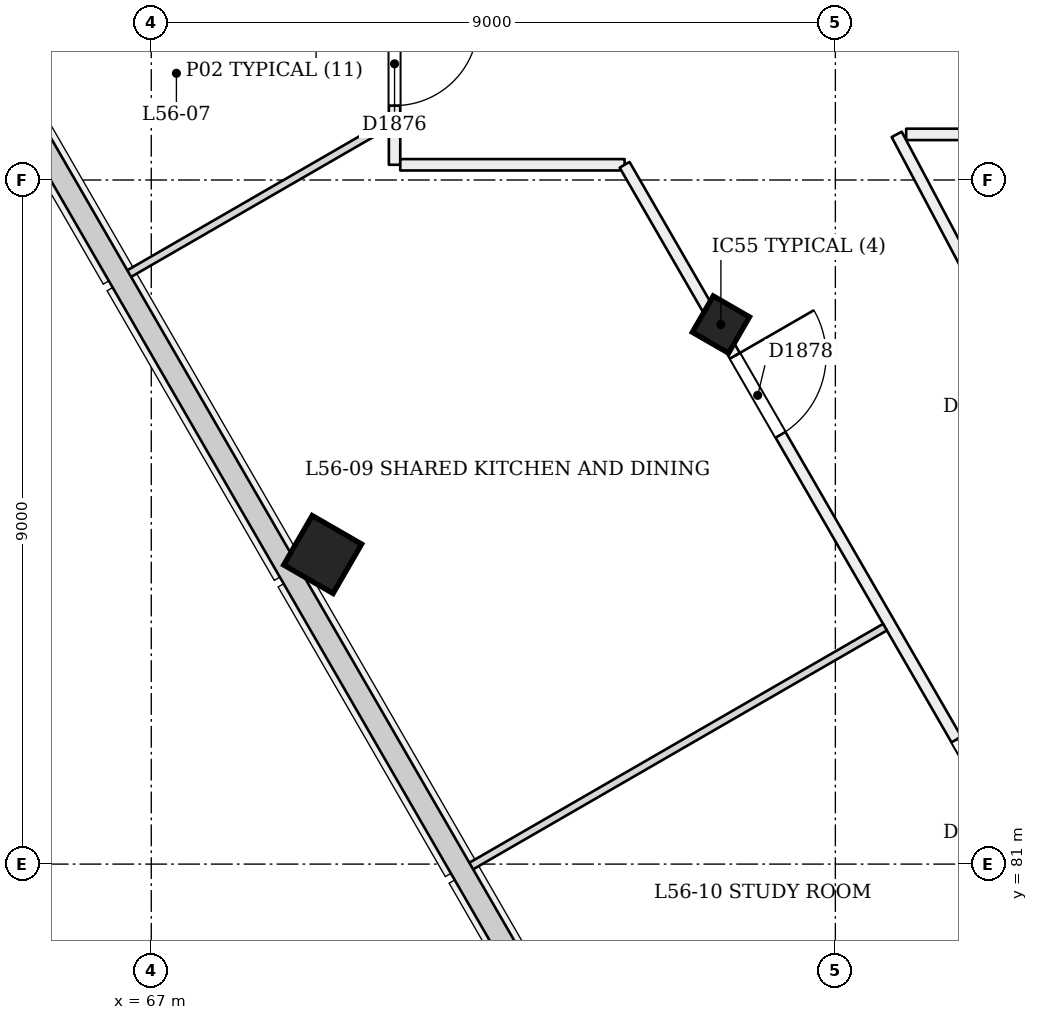
"""IFC4 building model, lengths in metres.
Left out: names, types, materials, properties, quantities, classifications, styles, units other than length and angle.
Written with IfcOpenShell. Run it as: python <this file> out.ifc"""

import sys

from ifc_helpers import new_model, si_unit, direction, frame, frame_2d, origin, origin_2d, place, context, subcontext, project, spatial, rectangle, extrude, element, fill, save


model = new_model("IFC4")
c1 = context("Model", 3, precision=1e-05, world=origin(), true_north=direction((0.0, 1.0)))
c2 = subcontext(c1, "Body", "Model", "MODEL_VIEW")
j1 = project(units=[si_unit("LENGTHUNIT", "METRE"), si_unit("PLANEANGLEUNIT", "RADIAN")], contexts=[c1])
p1 = place(None, origin())
s1 = spatial("IfcSite", under=j1, at=p1, CompositionType="ELEMENT")
p2 = place(p1, origin())
s2 = spatial("IfcBuilding", under=s1, at=p2, CompositionType="ELEMENT")
p3 = place(p2, frame((0.0, 0.0, 219.4)))
s3 = spatial("IfcBuildingStorey", under=s2, at=p3, CompositionType="ELEMENT", Elevation=219.4)
p4 = place(p3, frame((74.467, 88.051, -0.018), z_axis=(0.022212386598, 0.038397631711, 0.99901563139), x_axis=(-0.86602441233, -0.498523716892, 0.038416415044)))
e1 = element("IfcColumn", 1, at=p4, inside=s3, PredefinedType="COLUMN", context=c2, shape_type="SweptSolid", body=[
    extrude(rectangle(XDim=0.55, YDim=0.55, at=origin_2d()), origin(), (0.0, 0.0, 1.0), 3.605),
])
p5 = place(p3, frame((69.228, 85.026, -0.024), z_axis=(0.022212328788, 0.038465252292, 0.999013031354), x_axis=(-0.865642446172, -0.499182770382, 0.038467091643)))
e2 = element("IfcColumn", 2, at=p5, inside=s3, PredefinedType="COLUMN", context=c2, shape_type="SweptSolid", body=[
    extrude(rectangle(XDim=0.75, YDim=0.75, at=origin_2d()), origin(), (0.0, 0.0, 1.0), 3.605),
])
p6 = place(p3, frame((79.419, 85.678, 0.0), z_axis=(0.0, 0.0, 1.0), x_axis=(-0.468745112337, 0.883333470248, 0.0)))
e3 = element("IfcWall", 3, at=p6, inside=s3, PredefinedType="PARTITIONING", context=c2, shape_type="SweptSolid", body=[
    extrude(rectangle(XDim=5.572, YDim=0.15, at=frame_2d((2.786, 0.0))), origin(), (0.0, 0.0, 1.0), 3.2),
])
p7 = place(p6, frame((1.702, 0.0, 0.0)))
e4 = element("IfcOpeningElement", 4, at=p7, cuts=e3, PredefinedType="OPENING", context=c2, shape_type="SweptSolid", body=[
    extrude(rectangle(XDim=0.9, YDim=2.1, at=frame_2d((0.45, 1.05))), frame((0.0, 0.085, 0.0), z_axis=(0.0, -1.0, 0.0), x_axis=(1.0, 0.0, 0.0)), (0.0, 0.0, 1.0), 0.171),
])
p8 = place(p3, frame((76.932, 90.6, 0.0), z_axis=(0.0, 0.0, 1.0), x_axis=(1.0, 0.0, 0.0)))
e5 = element("IfcWall", 5, at=p8, inside=s3, PredefinedType="PARTITIONING", context=c2, shape_type="SweptSolid", body=[
    extrude(rectangle(XDim=5.068, YDim=0.15, at=frame_2d((2.534, 0.0))), origin(), (0.0, 0.0, 1.0), 3.2),
])
p9 = place(p3, frame((70.2, 95.443, 0.0), z_axis=(0.0, 0.0, 1.0), x_axis=(0.000139684312, -0.999999990244, 0.0)))
e6 = element("IfcWall", 6, at=p9, inside=s3, PredefinedType="PARTITIONING", context=c2, shape_type="SweptSolid", body=[
    extrude(rectangle(XDim=5.243, YDim=0.15, at=frame_2d((2.622, 0.0))), origin(), (0.0, 0.0, 1.0), 3.2),
])
p10 = place(p9, frame((3.365, 0.0, 0.0)))
e7 = element("IfcOpeningElement", 7, at=p10, cuts=e6, PredefinedType="OPENING", context=c2, shape_type="SweptSolid", body=[
    extrude(rectangle(XDim=1.1, YDim=2.1, at=frame_2d((0.55, 1.05))), frame((0.0, 0.085, 0.0), z_axis=(0.0, -1.0, 0.0), x_axis=(1.0, 0.0, 0.0)), (0.0, 0.0, 1.0), 0.171),
])
p11 = place(p3, frame((70.276, 90.2, 0.0), z_axis=(0.0, 0.0, 1.0), x_axis=(1.0, 0.0, 0.0)))
e8 = element("IfcWall", 8, at=p11, inside=s3, PredefinedType="PARTITIONING", context=c2, shape_type="SweptSolid", body=[
    extrude(rectangle(XDim=2.951, YDim=0.15, at=frame_2d((1.476, 0.0))), origin(), (0.0, 0.0, 1.0), 3.2),
])
p12 = place(p3, frame((73.227, 90.2, 0.0), z_axis=(0.0, 0.0, 1.0), x_axis=(0.500000996717, -0.866024828329, 0.0)))
e9 = element("IfcWall", 9, at=p12, inside=s3, PredefinedType="PARTITIONING", context=c2, shape_type="SweptSolid", body=[
    extrude(rectangle(XDim=23.545, YDim=0.15, at=frame_2d((11.773, 0.0))), origin(), (0.0, 0.0, 1.0), 2.8),
])
p13 = place(p12, frame((2.902, 0.0, 0.0)))
e10 = element("IfcOpeningElement", 10, at=p13, cuts=e9, PredefinedType="OPENING", context=c2, shape_type="SweptSolid", body=[
    extrude(rectangle(XDim=1.2, YDim=2.1, at=frame_2d((0.6, 1.05))), frame((0.0, 0.085, 0.0), z_axis=(0.0, -1.0, 0.0), x_axis=(1.0, 0.0, 0.0)), (0.0, 0.0, 1.0), 0.171),
])
p14 = place(p12, frame((8.731, 0.0, 0.0)))
e11 = element("IfcOpeningElement", 11, at=p14, cuts=e9, PredefinedType="OPENING", context=c2, shape_type="SweptSolid", body=[
    extrude(rectangle(XDim=1.0, YDim=2.1, at=frame_2d((0.5, 1.05))), frame((0.0, 0.085, 0.0), z_axis=(0.0, -1.0, 0.0), x_axis=(1.0, 0.0, 0.0)), (0.0, 0.0, 1.0), 0.171),
])
p15 = place(p12, frame((14.26, 0.0, 0.0)))
e12 = element("IfcOpeningElement", 12, at=p15, cuts=e9, PredefinedType="OPENING", context=c2, shape_type="SweptSolid", body=[
    extrude(rectangle(XDim=1.0, YDim=2.1, at=frame_2d((0.5, 1.05))), frame((0.0, 0.085, 0.0), z_axis=(0.0, -1.0, 0.0), x_axis=(1.0, 0.0, 0.0)), (0.0, 0.0, 1.0), 0.171),
])
p16 = place(p12, frame((18.76, 0.0, 0.0)))
e13 = element("IfcOpeningElement", 13, at=p16, cuts=e9, PredefinedType="OPENING", context=c2, shape_type="SweptSolid", body=[
    extrude(rectangle(XDim=1.0, YDim=2.1, at=frame_2d((0.5, 1.05))), frame((0.0, 0.085, 0.0), z_axis=(0.0, -1.0, 0.0), x_axis=(1.0, 0.0, 0.0)), (0.0, 0.0, 1.0), 0.171),
])
p17 = place(p12, frame((21.735, 0.0, 0.0)))
e14 = element("IfcOpeningElement", 14, at=p17, cuts=e9, PredefinedType="OPENING", context=c2, shape_type="SweptSolid", body=[
    extrude(rectangle(XDim=1.2, YDim=2.1, at=frame_2d((0.6, 1.05))), frame((0.0, 0.085, 0.0), z_axis=(0.0, -1.0, 0.0), x_axis=(1.0, 0.0, 0.0)), (0.0, 0.0, 1.0), 0.171),
])
p18 = place(p3, frame((66.657, 88.739, 0.0), z_axis=(0.0, 0.0, 1.0), x_axis=(0.866024026425, 0.500002385648, 0.0)))
e15 = element("IfcWall", 15, at=p18, inside=s3, PredefinedType="PARTITIONING", context=c2, shape_type="SweptSolid", body=[
    extrude(rectangle(XDim=3.976, YDim=0.1, at=frame_2d((1.988, 0.0))), origin(), (0.0, 0.0, 1.0), 2.7),
])
p19 = place(p3, frame((71.157, 80.944, 0.0), z_axis=(0.0, 0.0, 1.0), x_axis=(0.866025401434, 0.500000004071, 0.0)))
e16 = element("IfcWall", 16, at=p19, inside=s3, PredefinedType="PARTITIONING", context=c2, shape_type="SweptSolid", body=[
    extrude(rectangle(XDim=6.345, YDim=0.1, at=frame_2d((3.173, 0.0))), origin(), (0.0, 0.0, 1.0), 2.7),
])
p20 = place(p3, frame((76.456, 78.807, 0.0), z_axis=(0.0, 0.0, 1.0), x_axis=(0.866011447264, 0.500024172624, 0.0)))
e17 = element("IfcWall", 17, at=p20, inside=s3, PredefinedType="PARTITIONING", context=c2, shape_type="SweptSolid", body=[
    extrude(rectangle(XDim=2.825, YDim=0.1, at=frame_2d((1.413, 0.0))), origin(), (0.0, 0.0, 1.0), 2.8),
])
p21 = place(p10, origin())
e18 = element("IfcDoor", 18, at=p21, inside=s3, OperationType="SINGLE_SWING_LEFT", PredefinedType="NOTDEFINED", context=c2, shape_type="SweptSolid", body=[
    extrude(rectangle(XDim=1.1, YDim=2.1, at=frame_2d((0.55, 1.05))), frame((0.0, 0.025, 0.0), z_axis=(0.0, -1.0, 0.0), x_axis=(1.0, 0.0, 0.0)), (0.0, 0.0, 1.0), 0.05),
])
fill(e7, e18)
p22 = place(p13, origin())
e19 = element("IfcDoor", 19, at=p22, inside=s3, OperationType="SINGLE_SWING_LEFT", PredefinedType="NOTDEFINED", context=c2, shape_type="SweptSolid", body=[
    extrude(rectangle(XDim=1.2, YDim=2.1, at=frame_2d((0.6, 1.05))), frame((0.0, 0.025, 0.0), z_axis=(0.0, -1.0, 0.0), x_axis=(1.0, 0.0, 0.0)), (0.0, 0.0, 1.0), 0.05),
])
fill(e10, e19)
p23 = place(p14, origin())
e20 = element("IfcDoor", 20, at=p23, inside=s3, OperationType="SINGLE_SWING_LEFT", PredefinedType="NOTDEFINED", context=c2, shape_type="SweptSolid", body=[
    extrude(rectangle(XDim=1.0, YDim=2.1, at=frame_2d((0.5, 1.05))), frame((0.0, 0.025, 0.0), z_axis=(0.0, -1.0, 0.0), x_axis=(1.0, 0.0, 0.0)), (0.0, 0.0, 1.0), 0.05),
])
fill(e11, e20)
save(model, sys.argv[1])
